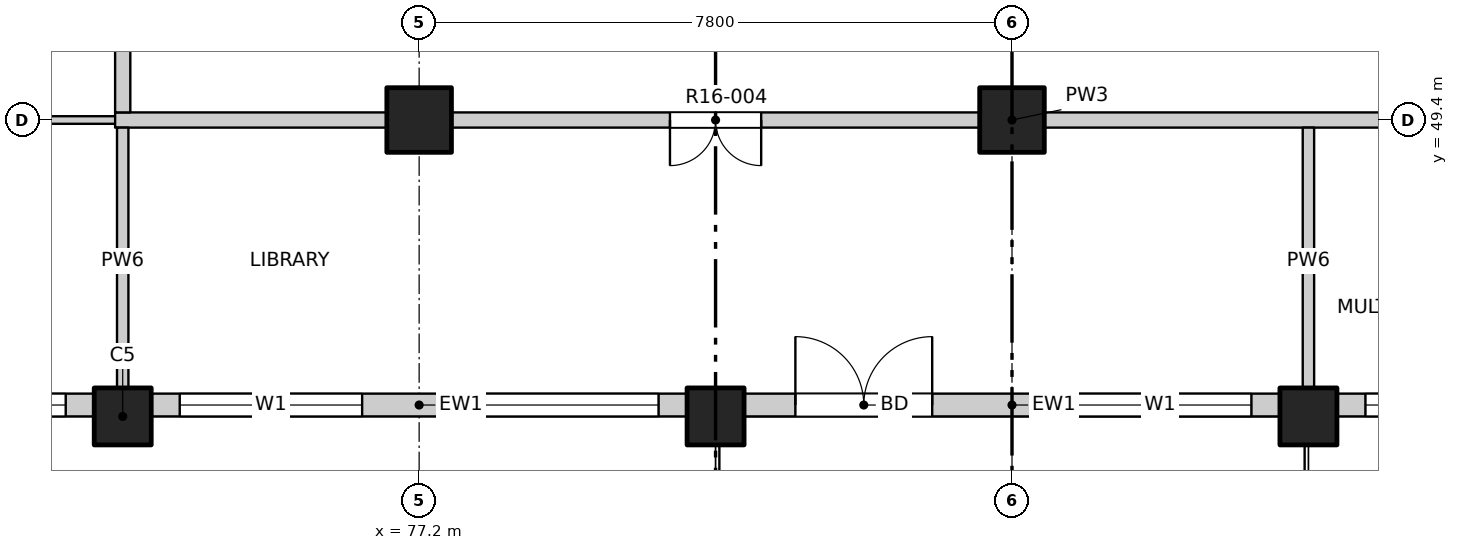
"""IFC4 building model, lengths in metres.
Left out: names, types, materials, properties, quantities, classifications, styles, units other than length and angle.
Written with IfcOpenShell. Run it as: python <this file> out.ifc"""

import sys

from ifc_helpers import new_model, si_unit, direction, frame, frame_2d, origin, origin_2d, place, context, subcontext, project, spatial, rectangle, extrude, element, fill, save


model = new_model("IFC4")
c1 = context("Model", 3, precision=1e-05, world=origin(), true_north=direction((0.0, 1.0)))
c2 = subcontext(c1, "Body", "Model", "MODEL_VIEW")
j1 = project(units=[si_unit("LENGTHUNIT", "METRE"), si_unit("PLANEANGLEUNIT", "RADIAN")], contexts=[c1])
p1 = place(None, origin())
s1 = spatial("IfcSite", under=j1, at=p1, CompositionType="ELEMENT")
p2 = place(p1, origin())
s2 = spatial("IfcBuilding", under=s1, at=p2, CompositionType="ELEMENT")
p3 = place(p2, frame((0.0, 0.0, 169.0)))
s3 = spatial("IfcBuildingStorey", under=s2, at=p3, CompositionType="ELEMENT", Elevation=169.0)
for number, where, z_axis, x_axis in (
    (1, (73.3, 45.5, -0.25), (0.0, 0.0, 1.0), (1.0, 0.0, 0.0)),
    (2, (81.1, 45.5, -0.25), (0.0, 0.0, 1.0), (1.0, 0.0, 0.0)),
    (3, (88.9, 45.5, -0.25), (0.0, 0.0, 1.0), (1.0, 0.0, 0.0)),
):
    element("IfcColumn", number, at=place(p3, frame(where, z_axis=z_axis, x_axis=x_axis)), inside=s3, PredefinedType="COLUMN", context=c2, shape_type="SweptSolid", body=[
        extrude(rectangle(XDim=0.75, YDim=0.75, at=origin_2d()), origin(), (0.0, 0.0, 1.0), 3.35),
    ])
for number, where, z_axis, x_axis in (
    (4, (77.2, 49.4, -0.25), (0.0, 0.0, 1.0), (1.0, 0.0, 0.0)),
    (5, (85.0, 49.4, -0.25), (0.0, 0.0, 1.0), (1.0, 0.0, 0.0)),
):
    element("IfcColumn", number, at=place(p3, frame(where, z_axis=z_axis, x_axis=x_axis)), inside=s3, PredefinedType="COLUMN", context=c2, shape_type="SweptSolid", body=[
        extrude(rectangle(XDim=0.85, YDim=0.85, at=origin_2d()), origin(), (0.0, 0.0, 1.0), 3.35),
    ])
p4 = place(p3, frame((69.4, 45.65, 0.0), z_axis=(0.0, 0.0, 1.0), x_axis=(1.0, 0.0, 0.0)))
e6 = element("IfcWall", 6, at=p4, inside=s3, PredefinedType="SOLIDWALL", context=c2, shape_type="SweptSolid", body=[
    extrude(rectangle(XDim=3.525, YDim=0.3, at=frame_2d((1.763, 0.0))), origin(), (0.0, 0.0, 1.0), 3.1),
])
p5 = place(p4, frame((0.75, 0.0, 0.9)))
e7 = element("IfcOpeningElement", 7, at=p5, cuts=e6, PredefinedType="OPENING", context=c2, shape_type="SweptSolid", body=[
    extrude(rectangle(XDim=2.4, YDim=1.8, at=frame_2d((1.2, 0.9))), frame((0.0, 0.16, 0.0), z_axis=(0.0, -1.0, 0.0), x_axis=(1.0, 0.0, 0.0)), (0.0, 0.0, 1.0), 0.32),
])
p6 = place(p3, frame((73.675, 45.65, 0.0), z_axis=(0.0, 0.0, 1.0), x_axis=(1.0, 0.0, 0.0)))
e8 = element("IfcWall", 8, at=p6, inside=s3, PredefinedType="SOLIDWALL", context=c2, shape_type="SweptSolid", body=[
    extrude(rectangle(XDim=7.05, YDim=0.3, at=frame_2d((3.525, 0.0))), origin(), (0.0, 0.0, 1.0), 3.1),
])
p7 = place(p6, frame((0.375, 0.0, 0.9)))
e9 = element("IfcOpeningElement", 9, at=p7, cuts=e8, PredefinedType="OPENING", context=c2, shape_type="SweptSolid", body=[
    extrude(rectangle(XDim=2.4, YDim=1.8, at=frame_2d((1.2, 0.9))), frame((0.0, 0.16, 0.0), z_axis=(0.0, -1.0, 0.0), x_axis=(1.0, 0.0, 0.0)), (0.0, 0.0, 1.0), 0.32),
])
p8 = place(p6, frame((4.275, 0.0, 0.9)))
e10 = element("IfcOpeningElement", 10, at=p8, cuts=e8, PredefinedType="OPENING", context=c2, shape_type="SweptSolid", body=[
    extrude(rectangle(XDim=2.4, YDim=1.8, at=frame_2d((1.2, 0.9))), frame((0.0, 0.16, 0.0), z_axis=(0.0, -1.0, 0.0), x_axis=(1.0, 0.0, 0.0)), (0.0, 0.0, 1.0), 0.32),
])
p9 = place(p3, frame((81.475, 45.65, 0.0), z_axis=(0.0, 0.0, 1.0), x_axis=(1.0, 0.0, 0.0)))
e11 = element("IfcWall", 11, at=p9, inside=s3, PredefinedType="SOLIDWALL", context=c2, shape_type="SweptSolid", body=[
    extrude(rectangle(XDim=7.05, YDim=0.3, at=frame_2d((3.525, 0.0))), origin(), (0.0, 0.0, 1.0), 3.1),
])
p10 = place(p9, frame((0.675, 0.0, 0.0)))
e12 = element("IfcOpeningElement", 12, at=p10, cuts=e11, PredefinedType="OPENING", context=c2, shape_type="SweptSolid", body=[
    extrude(rectangle(XDim=1.8, YDim=2.4, at=frame_2d((0.9, 1.2))), frame((0.0, 0.16, 0.0), z_axis=(0.0, -1.0, 0.0), x_axis=(1.0, 0.0, 0.0)), (0.0, 0.0, 1.0), 0.32),
])
p11 = place(p9, frame((4.275, 0.0, 0.9)))
e13 = element("IfcOpeningElement", 13, at=p11, cuts=e11, PredefinedType="OPENING", context=c2, shape_type="SweptSolid", body=[
    extrude(rectangle(XDim=2.4, YDim=1.8, at=frame_2d((1.2, 0.9))), frame((0.0, 0.16, 0.0), z_axis=(0.0, -1.0, 0.0), x_axis=(1.0, 0.0, 0.0)), (0.0, 0.0, 1.0), 0.32),
])
p12 = place(p3, frame((89.275, 45.65, 0.0), z_axis=(0.0, 0.0, 1.0), x_axis=(1.0, 0.0, 0.0)))
e14 = element("IfcWall", 14, at=p12, inside=s3, PredefinedType="SOLIDWALL", context=c2, shape_type="SweptSolid", body=[
    extrude(rectangle(XDim=7.05, YDim=0.3, at=frame_2d((3.525, 0.0))), origin(), (0.0, 0.0, 1.0), 3.1),
])
p13 = place(p12, frame((0.375, 0.0, 0.9)))
e15 = element("IfcOpeningElement", 15, at=p13, cuts=e14, PredefinedType="OPENING", context=c2, shape_type="SweptSolid", body=[
    extrude(rectangle(XDim=2.4, YDim=1.8, at=frame_2d((1.2, 0.9))), frame((0.0, 0.16, 0.0), z_axis=(0.0, -1.0, 0.0), x_axis=(1.0, 0.0, 0.0)), (0.0, 0.0, 1.0), 0.32),
])
p14 = place(p12, frame((4.275, 0.0, 0.9)))
e16 = element("IfcOpeningElement", 16, at=p14, cuts=e14, PredefinedType="OPENING", context=c2, shape_type="SweptSolid", body=[
    extrude(rectangle(XDim=2.4, YDim=1.8, at=frame_2d((1.2, 0.9))), frame((0.0, 0.16, 0.0), z_axis=(0.0, -1.0, 0.0), x_axis=(1.0, 0.0, 0.0)), (0.0, 0.0, 1.0), 0.32),
])
p15 = place(p3, frame((65.8, 49.4, 0.0), z_axis=(0.0, 0.0, 1.0), x_axis=(1.0, 0.0, 0.0)))
e17 = element("IfcWall", 17, at=p15, inside=s3, PredefinedType="PARTITIONING", context=c2, shape_type="SweptSolid", body=[
    extrude(rectangle(XDim=7.6, YDim=0.1, at=frame_2d((3.8, 0.0))), origin(), (0.0, 0.0, 1.0), 3.1),
])
p16 = place(p15, frame((4.14, 0.0, 0.0)))
e18 = element("IfcOpeningElement", 18, at=p16, cuts=e17, PredefinedType="OPENING", context=c2, shape_type="SweptSolid", body=[
    extrude(rectangle(XDim=0.9, YDim=2.1, at=frame_2d((0.45, 1.05))), frame((0.0, 0.06, 0.0), z_axis=(0.0, -1.0, 0.0), x_axis=(1.0, 0.0, 0.0)), (0.0, 0.0, 1.0), 0.12),
])
p17 = place(p3, frame((73.2, 49.4, 0.0), z_axis=(0.0, 0.0, 1.0), x_axis=(1.0, 0.0, 0.0)))
e19 = element("IfcWall", 19, at=p17, inside=s3, PredefinedType="PARTITIONING", context=c2, shape_type="SweptSolid", body=[
    extrude(rectangle(XDim=23.6, YDim=0.2, at=frame_2d((11.8, 0.0))), origin(), (0.0, 0.0, 1.0), 3.1),
])
p18 = place(p17, frame((7.3, 0.0, 0.0)))
e20 = element("IfcOpeningElement", 20, at=p18, cuts=e19, PredefinedType="OPENING", context=c2, shape_type="SweptSolid", body=[
    extrude(rectangle(XDim=1.2, YDim=2.1, at=frame_2d((0.6, 1.05))), frame((0.0, 0.11, 0.0), z_axis=(0.0, -1.0, 0.0), x_axis=(1.0, 0.0, 0.0)), (0.0, 0.0, 1.0), 0.22),
])
p19 = place(p17, frame((20.125, 0.0, 0.0)))
e21 = element("IfcOpeningElement", 21, at=p19, cuts=e19, PredefinedType="OPENING", context=c2, shape_type="SweptSolid", body=[
    extrude(rectangle(XDim=1.2, YDim=2.1, at=frame_2d((0.6, 1.05))), frame((0.0, 0.11, 0.0), z_axis=(0.0, -1.0, 0.0), x_axis=(1.0, 0.0, 0.0)), (0.0, 0.0, 1.0), 0.22),
])
p20 = place(p3, frame((73.3, 45.8, 0.0), z_axis=(0.0, 0.0, 1.0), x_axis=(0.0, 1.0, 0.0)))
e22 = element("IfcWall", 22, at=p20, inside=s3, PredefinedType="PARTITIONING", context=c2, shape_type="SweptSolid", body=[
    extrude(rectangle(XDim=3.5, YDim=0.15, at=frame_2d((1.75, 0.0))), origin(), (0.0, 0.0, 1.0), 3.1),
])
p21 = place(p3, frame((73.3, 49.5, 0.0), z_axis=(0.0, 0.0, 1.0), x_axis=(0.0, 1.0, 0.0)))
e23 = element("IfcWall", 23, at=p21, inside=s3, PredefinedType="PARTITIONING", context=c2, shape_type="SweptSolid", body=[
    extrude(rectangle(XDim=34.7, YDim=0.2, at=frame_2d((17.35, 0.0))), origin(), (0.0, 0.0, 1.0), 3.1),
])
p22 = place(p21, frame((14.275, 0.0, 0.0)))
e24 = element("IfcOpeningElement", 24, at=p22, cuts=e23, PredefinedType="OPENING", context=c2, shape_type="SweptSolid", body=[
    extrude(rectangle(XDim=1.0, YDim=2.1, at=frame_2d((0.5, 1.05))), frame((0.0, 0.11, 0.0), z_axis=(0.0, -1.0, 0.0), x_axis=(1.0, 0.0, 0.0)), (0.0, 0.0, 1.0), 0.22),
])
p23 = place(p21, frame((21.925, 0.0, 0.0)))
e25 = element("IfcOpeningElement", 25, at=p23, cuts=e23, PredefinedType="OPENING", context=c2, shape_type="SweptSolid", body=[
    extrude(rectangle(XDim=1.0, YDim=2.1, at=frame_2d((0.5, 1.05))), frame((0.0, 0.11, 0.0), z_axis=(0.0, -1.0, 0.0), x_axis=(1.0, 0.0, 0.0)), (0.0, 0.0, 1.0), 0.22),
])
p24 = place(p21, frame((29.125, 0.0, 0.0)))
e26 = element("IfcOpeningElement", 26, at=p24, cuts=e23, PredefinedType="OPENING", context=c2, shape_type="SweptSolid", body=[
    extrude(rectangle(XDim=1.0, YDim=2.1, at=frame_2d((0.5, 1.05))), frame((0.0, 0.11, 0.0), z_axis=(0.0, -1.0, 0.0), x_axis=(1.0, 0.0, 0.0)), (0.0, 0.0, 1.0), 0.22),
])
p25 = place(p3, frame((88.9, 45.8, 0.0), z_axis=(0.0, 0.0, 1.0), x_axis=(0.0, 1.0, 0.0)))
e27 = element("IfcWall", 27, at=p25, inside=s3, PredefinedType="PARTITIONING", context=c2, shape_type="SweptSolid", body=[
    extrude(rectangle(XDim=3.5, YDim=0.15, at=frame_2d((1.75, 0.0))), origin(), (0.0, 0.0, 1.0), 3.1),
])
p26 = place(p5, origin())
e28 = element("IfcWindow", 28, at=p26, inside=s3, PartitioningType="DOUBLE_PANEL_VERTICAL", PredefinedType="WINDOW", context=c2, shape_type="SweptSolid", body=[
    extrude(rectangle(XDim=2.4, YDim=1.8, at=frame_2d((1.2, 0.9))), frame((0.0, 0.03, 0.0), z_axis=(0.0, -1.0, 0.0), x_axis=(1.0, 0.0, 0.0)), (0.0, 0.0, 1.0), 0.06),
])
fill(e7, e28)
p27 = place(p7, origin())
e29 = element("IfcWindow", 29, at=p27, inside=s3, PartitioningType="DOUBLE_PANEL_VERTICAL", PredefinedType="WINDOW", context=c2, shape_type="SweptSolid", body=[
    extrude(rectangle(XDim=2.4, YDim=1.8, at=frame_2d((1.2, 0.9))), frame((0.0, 0.03, 0.0), z_axis=(0.0, -1.0, 0.0), x_axis=(1.0, 0.0, 0.0)), (0.0, 0.0, 1.0), 0.06),
])
fill(e9, e29)
p28 = place(p8, origin())
e30 = element("IfcWindow", 30, at=p28, inside=s3, PartitioningType="DOUBLE_PANEL_VERTICAL", PredefinedType="WINDOW", context=c2, shape_type="SweptSolid", body=[
    extrude(rectangle(XDim=2.4, YDim=1.8, at=frame_2d((1.2, 0.9))), frame((0.0, 0.03, 0.0), z_axis=(0.0, -1.0, 0.0), x_axis=(1.0, 0.0, 0.0)), (0.0, 0.0, 1.0), 0.06),
])
fill(e10, e30)
p29 = place(p10, origin())
e31 = element("IfcDoor", 31, at=p29, inside=s3, OperationType="DOUBLE_DOOR_SINGLE_SWING", PredefinedType="DOOR", context=c2, shape_type="SweptSolid", body=[
    extrude(rectangle(XDim=1.8, YDim=2.4, at=frame_2d((0.9, 1.2))), frame((0.0, 0.025, 0.0), z_axis=(0.0, -1.0, 0.0), x_axis=(1.0, 0.0, 0.0)), (0.0, 0.0, 1.0), 0.05),
])
fill(e12, e31)
p30 = place(p11, origin())
e32 = element("IfcWindow", 32, at=p30, inside=s3, PartitioningType="DOUBLE_PANEL_VERTICAL", PredefinedType="WINDOW", context=c2, shape_type="SweptSolid", body=[
    extrude(rectangle(XDim=2.4, YDim=1.8, at=frame_2d((1.2, 0.9))), frame((0.0, 0.03, 0.0), z_axis=(0.0, -1.0, 0.0), x_axis=(1.0, 0.0, 0.0)), (0.0, 0.0, 1.0), 0.06),
])
fill(e13, e32)
p31 = place(p13, origin())
e33 = element("IfcWindow", 33, at=p31, inside=s3, PartitioningType="DOUBLE_PANEL_VERTICAL", PredefinedType="WINDOW", context=c2, shape_type="SweptSolid", body=[
    extrude(rectangle(XDim=2.4, YDim=1.8, at=frame_2d((1.2, 0.9))), frame((0.0, 0.03, 0.0), z_axis=(0.0, -1.0, 0.0), x_axis=(1.0, 0.0, 0.0)), (0.0, 0.0, 1.0), 0.06),
])
fill(e15, e33)
p32 = place(p18, origin())
e34 = element("IfcDoor", 34, at=p32, inside=s3, OperationType="DOUBLE_DOOR_SINGLE_SWING", PredefinedType="DOOR", context=c2, shape_type="SweptSolid", body=[
    extrude(rectangle(XDim=1.2, YDim=2.1, at=frame_2d((0.6, 1.05))), frame((0.0, 0.025, 0.0), z_axis=(0.0, -1.0, 0.0), x_axis=(1.0, 0.0, 0.0)), (0.0, 0.0, 1.0), 0.05),
])
fill(e20, e34)
save(model, sys.argv[1])
